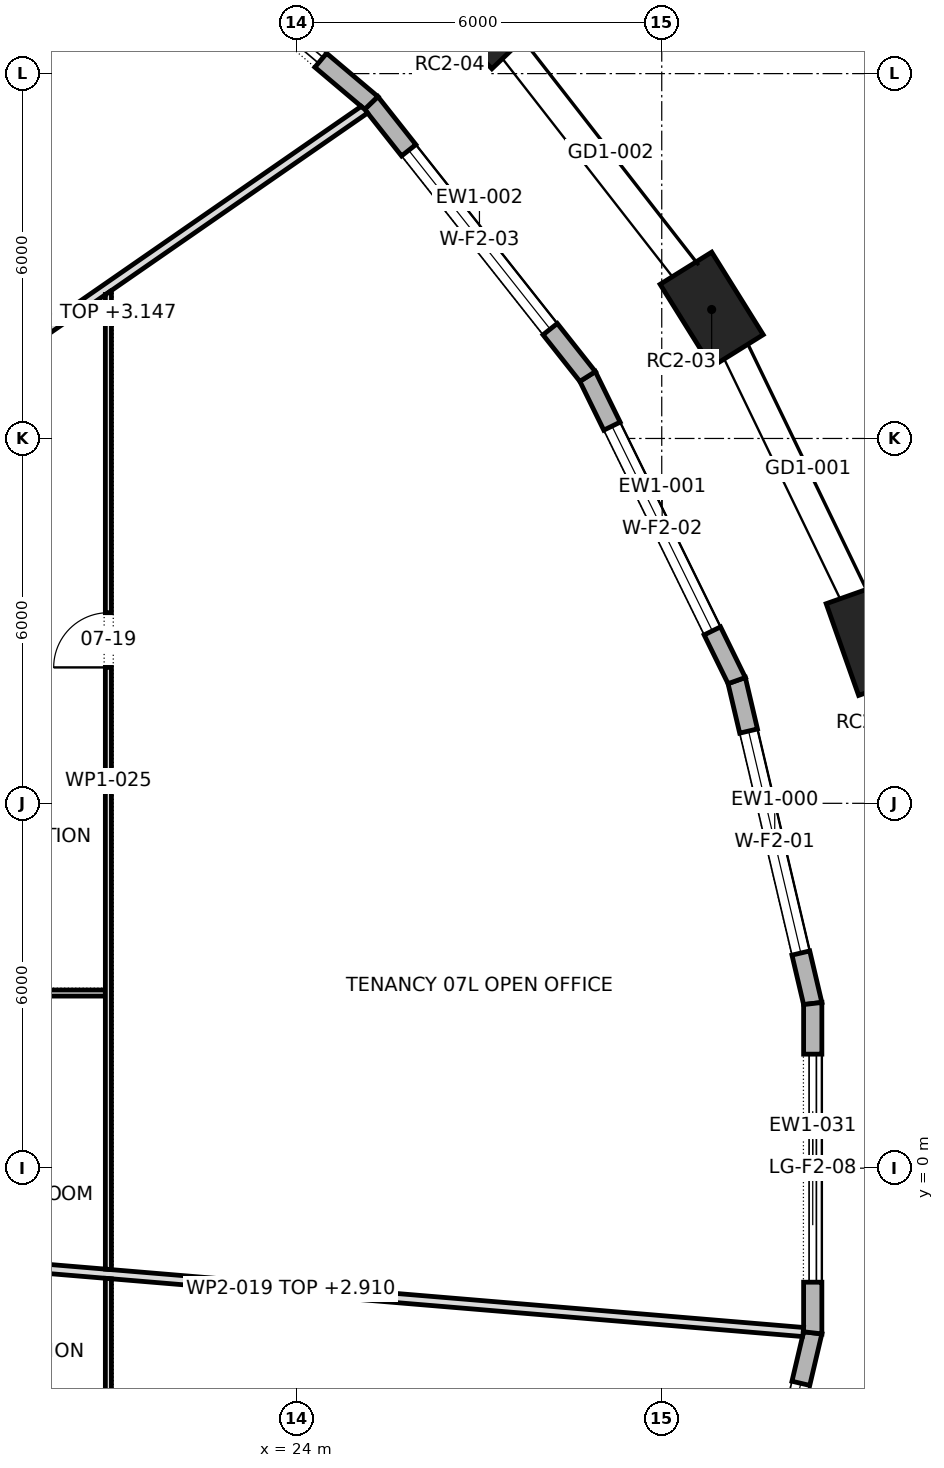
"""IFC4 building model, lengths in metres.
Left out: names, types, materials, properties, quantities, classifications, styles, units other than length and angle.
Written with IfcOpenShell. Run it as: python <this file> out.ifc"""

import sys

from ifc_helpers import new_model, si_unit, direction, frame, frame_2d, origin, origin_2d, place, context, subcontext, project, spatial, polyline, rectangle, outline, extrude, element, fill, save


model = new_model("IFC4")
c1 = context("Model", 3, precision=1e-05, world=origin(), true_north=direction((0.0, 1.0)))
c2 = subcontext(c1, "Body", "Model", "MODEL_VIEW")
j1 = project(units=[si_unit("LENGTHUNIT", "METRE"), si_unit("PLANEANGLEUNIT", "RADIAN")], contexts=[c1])
p1 = place(None, origin())
s1 = spatial("IfcSite", under=j1, at=p1, CompositionType="ELEMENT")
p2 = place(p1, origin())
s2 = spatial("IfcBuilding", under=s1, at=p2, CompositionType="ELEMENT")
p3 = place(p2, frame((0.0, 0.0, 112.9)))
s3 = spatial("IfcBuildingStorey", under=s2, at=p3, CompositionType="ELEMENT", Elevation=112.9)
for number, where, z_axis, x_axis in (
    (1, (33.443, 8.695, 0.0), (0.0, 0.0, 1.0), (-0.334, 0.943, 0.0)),
    (2, (30.821, 14.121, 0.0), (0.0, 0.0, 1.0), (-0.529, 0.849, 0.0)),
    (3, (27.015, 19.003, 0.0), (0.0, 0.0, 1.0), (-0.692, 0.722, 0.0)),
):
    element("IfcColumn", number, at=place(p3, frame(where, z_axis=z_axis, x_axis=x_axis)), inside=s3, PredefinedType="COLUMN", context=c2, shape_type="SweptSolid", body=[
        extrude(rectangle(XDim=1.6, YDim=1.0, at=origin_2d()), origin(), (0.0, 0.0, 1.0), 4.2),
    ])
p4 = place(p3, frame((32.483, 2.708, 0.0), z_axis=(0.0, 0.0, 1.0), x_axis=(-0.229193964616, 0.973380771632, 0.0)))
e4 = element("IfcWall", 4, at=p4, inside=s3, PredefinedType="STANDARD", context=c2, shape_type="SweptSolid", body=[
    extrude(outline(polyline([(-0.017, -0.15), (5.473, -0.15), (5.439, 0.15), (0.017, 0.15), (-0.017, -0.15)])), origin(), (0.0, 0.0, 1.0), 3.9),
])
p5 = place(p4, frame((0.853, 0.0, 0.6)))
e5 = element("IfcOpeningElement", 5, at=p5, cuts=e4, PredefinedType="OPENING", context=c2, shape_type="SweptSolid", body=[
    extrude(rectangle(XDim=3.75, YDim=2.85, at=frame_2d((1.875, 1.425))), frame((0.0, 0.162, 0.0), z_axis=(0.0, -1.0, 0.0), x_axis=(1.0, 0.0, 0.0)), (0.0, 0.0, 1.0), 0.324),
])
p6 = place(p3, frame((31.233, 8.019, 0.0), z_axis=(0.0, 0.0, 1.0), x_axis=(-0.440238988749, 0.897880633929, 0.0)))
e6 = element("IfcWall", 6, at=p6, inside=s3, PredefinedType="STANDARD", context=c2, shape_type="SweptSolid", body=[
    extrude(outline(polyline([(-0.017, -0.15), (5.586, -0.15), (5.553, 0.15), (0.017, 0.15), (-0.017, -0.15)])), origin(), (0.0, 0.0, 1.0), 3.9),
])
p7 = place(p6, frame((0.91, 0.0, 0.6)))
e7 = element("IfcOpeningElement", 7, at=p7, cuts=e6, PredefinedType="OPENING", context=c2, shape_type="SweptSolid", body=[
    extrude(rectangle(XDim=3.75, YDim=2.85, at=frame_2d((1.875, 1.425))), frame((0.0, 0.162, 0.0), z_axis=(0.0, -1.0, 0.0), x_axis=(1.0, 0.0, 0.0)), (0.0, 0.0, 1.0), 0.324),
])
p8 = place(p3, frame((28.781, 13.019, 0.0), z_axis=(0.0, 0.0, 1.0), x_axis=(-0.620329992039, 0.784340934146, 0.0)))
e8 = element("IfcWall", 8, at=p8, inside=s3, PredefinedType="STANDARD", context=c2, shape_type="SweptSolid", body=[
    extrude(outline(polyline([(-0.016, -0.15), (5.75, -0.15), (5.72, 0.15), (0.016, 0.15), (-0.016, -0.15)])), origin(), (0.0, 0.0, 1.0), 3.9),
])
p9 = place(p8, frame((0.993, 0.0, 0.6)))
e9 = element("IfcOpeningElement", 9, at=p9, cuts=e8, PredefinedType="OPENING", context=c2, shape_type="SweptSolid", body=[
    extrude(rectangle(XDim=3.75, YDim=2.85, at=frame_2d((1.875, 1.425))), frame((0.0, 0.162, 0.0), z_axis=(0.0, -1.0, 0.0), x_axis=(1.0, 0.0, 0.0)), (0.0, 0.0, 1.0), 0.324),
])
p10 = place(p3, frame((25.223, 17.518, 0.0), z_axis=(0.0, 0.0, 1.0), x_axis=(-0.763894031266, 0.645341699409, 0.0)))
e10 = element("IfcWall", 10, at=p10, inside=s3, PredefinedType="STANDARD", context=c2, shape_type="SweptSolid", body=[
    extrude(outline(polyline([(-0.015, -0.15), (5.939, -0.15), (5.911, 0.15), (0.015, 0.15), (-0.015, -0.15)])), origin(), (0.0, 0.0, 1.0), 3.9),
])
p11 = place(p10, frame((1.087, 0.0, 0.0)))
e11 = element("IfcOpeningElement", 11, at=p11, cuts=e10, PredefinedType="OPENING", context=c2, shape_type="SweptSolid", body=[
    extrude(rectangle(XDim=3.75, YDim=3.45, at=frame_2d((1.875, 1.725))), frame((0.0, 0.162, 0.0), z_axis=(0.0, -1.0, 0.0), x_axis=(1.0, 0.0, 0.0)), (0.0, 0.0, 1.0), 0.324),
])
p12 = place(p3, frame((31.233, -8.019, 0.0), z_axis=(0.0, 0.0, 1.0), x_axis=(0.229193964616, 0.973380771632, 0.0)))
e12 = element("IfcWall", 12, at=p12, inside=s3, PredefinedType="STANDARD", context=c2, shape_type="SweptSolid", body=[
    extrude(outline(polyline([(-0.017, -0.15), (5.473, -0.15), (5.439, 0.15), (0.017, 0.15), (-0.017, -0.15)])), origin(), (0.0, 0.0, 1.0), 3.9),
])
p13 = place(p12, frame((0.853, 0.0, 0.6)))
e13 = element("IfcOpeningElement", 13, at=p13, cuts=e12, PredefinedType="OPENING", context=c2, shape_type="SweptSolid", body=[
    extrude(rectangle(XDim=3.75, YDim=2.85, at=frame_2d((1.875, 1.425))), frame((0.0, 0.162, 0.0), z_axis=(0.0, -1.0, 0.0), x_axis=(1.0, 0.0, 0.0)), (0.0, 0.0, 1.0), 0.324),
])
p14 = place(p3, frame((32.483, -2.708, 0.0), z_axis=(0.0, 0.0, 1.0), x_axis=(0.0, 1.0, 0.0)))
e14 = element("IfcWall", 14, at=p14, inside=s3, PredefinedType="STANDARD", context=c2, shape_type="SweptSolid", body=[
    extrude(outline(polyline([(-0.017, -0.15), (5.433, -0.15), (5.398, 0.15), (0.017, 0.15), (-0.017, -0.15)])), origin(), (0.0, 0.0, 1.0), 3.9),
])
p15 = place(p14, frame((0.833, 0.0, 0.0)))
e15 = element("IfcOpeningElement", 15, at=p15, cuts=e14, PredefinedType="OPENING", context=c2, shape_type="SweptSolid", body=[
    extrude(rectangle(XDim=3.75, YDim=3.45, at=frame_2d((1.875, 1.725))), frame((0.0, 0.162, 0.0), z_axis=(0.0, -1.0, 0.0), x_axis=(1.0, 0.0, 0.0)), (0.0, 0.0, 1.0), 0.324),
])
p16 = place(p3, frame((15.454, -1.284, 0.0), z_axis=(0.0, 0.0, 1.0), x_axis=(0.996525641357, -0.083286530234, 0.0)))
e16 = element("IfcWall", 16, at=p16, inside=s3, PredefinedType="PARTITIONING", context=c2, shape_type="SweptSolid", body=[
    extrude(outline(polyline([(0.028, -0.075), (1.905, -0.075), (3.783, -0.075), (5.66, -0.075), (7.538, -0.075), (9.416, -0.075), (11.293, -0.075), (13.171, -0.075), (15.048, -0.075), (16.926, -0.075), (16.931, -0.038), (16.931, 0.075), (15.05, 0.075), (13.169, 0.075), (11.288, 0.075), (9.406, 0.075), (7.525, 0.075), (5.644, 0.075), (3.762, 0.075), (1.881, 0.075), (0.0, 0.075), (0.0, 0.074), (0.006, 0.005), (0.021, 0.006), (0.028, -0.075)])), origin(), (0.0, 0.0, 1.0), 2.91),
])
p17 = place(p3, frame((15.46, 2.88, 0.0), z_axis=(0.0, 0.0, 1.0), x_axis=(1.0, 0.0, 0.0)))
e17 = element("IfcWall", 17, at=p17, inside=s3, PredefinedType="PARTITIONING", context=c2, shape_type="SweptSolid", body=[
    extrude(outline(polyline([(0.0, -0.05), (1.797, -0.05), (3.593, -0.05), (5.39, -0.05), (5.39, 0.05), (3.598, 0.05), (1.806, 0.05), (0.015, 0.05), (0.015, 0.0), (0.0, 0.0), (0.0, -0.05)])), origin(), (0.0, 0.0, 1.0), 3.9),
])
p18 = place(p3, frame((15.433, 10.702, 0.0), z_axis=(0.0, 0.0, 1.0), x_axis=(0.82202509952, 0.569451258458, 0.0)))
e18 = element("IfcWall", 18, at=p18, inside=s3, PredefinedType="PARTITIONING", context=c2, shape_type="SweptSolid", body=[
    extrude(outline(polyline([(0.0, -0.075), (1.635, -0.075), (3.269, -0.075), (4.904, -0.075), (6.538, -0.075), (6.54, -0.072), (6.544, -0.075), (8.291, -0.075), (10.038, -0.075), (11.785, -0.075), (11.785, -0.071), (11.78, 0.003), (11.761, 0.075), (9.818, 0.075), (7.875, 0.075), (5.932, 0.075), (3.989, 0.075), (2.046, 0.075), (0.104, 0.075), (0.0, -0.074), (0.0, -0.075)])), origin(), (0.0, 0.0, 1.0), 3.147),
])
p19 = place(p3, frame((20.9, -1.811, 0.0), z_axis=(0.0, 0.0, 1.0), x_axis=(0.0, -1.0, 0.0)))
e19 = element("IfcWall", 19, at=p19, inside=s3, PredefinedType="PARTITIONING", context=c2, shape_type="SweptSolid", body=[
    extrude(outline(polyline([(0.0, -0.05), (1.879, -0.05), (3.759, -0.05), (5.638, -0.05), (7.518, -0.05), (7.562, 0.049), (7.562, 0.05), (5.674, 0.05), (3.785, 0.05), (1.897, 0.05), (0.008, 0.05), (0.0, -0.047), (0.0, -0.05)])), origin(), (0.0, 0.0, 1.0), 3.9),
])
p20 = place(p19, frame((3.324, 0.0, 0.0)))
e20 = element("IfcOpeningElement", 20, at=p20, cuts=e19, PredefinedType="OPENING", context=c2, shape_type="SweptSolid", body=[
    extrude(rectangle(XDim=0.9, YDim=2.1, at=frame_2d((0.45, 1.05))), frame((0.0, 0.062, 0.0), z_axis=(0.0, -1.0, 0.0), x_axis=(1.0, 0.0, 0.0)), (0.0, 0.0, 1.0), 0.124),
])
p21 = place(p3, frame((20.9, -1.668, 0.0), z_axis=(0.0, 0.0, 1.0), x_axis=(0.0, 1.0, 0.0)))
e21 = element("IfcWall", 21, at=p21, inside=s3, PredefinedType="PARTITIONING", context=c2, shape_type="SweptSolid", body=[
    extrude(outline(polyline([(16.102, -0.05), (16.102, -0.05), (16.032, 0.05), (14.127, 0.05), (12.221, 0.05), (10.315, 0.05), (8.41, 0.05), (6.504, 0.05), (4.598, 0.05), (4.598, 0.05), (4.499, 0.05), (4.499, 0.05), (3.002, 0.05), (1.505, 0.05), (0.008, 0.05), (0.0, -0.049), (0.0, -0.05), (1.789, -0.05), (3.578, -0.05), (5.367, -0.05), (7.156, -0.05), (8.945, -0.05), (10.734, -0.05), (12.523, -0.05), (14.312, -0.05), (16.102, -0.05)])), origin(), (0.0, 0.0, 1.0), 3.9),
])
p22 = place(p21, frame((9.904, 0.0, 0.0)))
e22 = element("IfcOpeningElement", 22, at=p22, cuts=e21, PredefinedType="OPENING", context=c2, shape_type="SweptSolid", body=[
    extrude(rectangle(XDim=0.9, YDim=2.1, at=frame_2d((0.45, 1.05))), frame((0.0, 0.062, 0.0), z_axis=(0.0, -1.0, 0.0), x_axis=(1.0, 0.0, 0.0)), (0.0, 0.0, 1.0), 0.124),
])
p23 = place(p5, origin())
e23 = element("IfcWindow", 23, at=p23, inside=s3, PartitioningType="TRIPLE_PANEL_VERTICAL", PredefinedType="WINDOW", context=c2, shape_type="SweptSolid", body=[
    extrude(rectangle(XDim=3.75, YDim=2.85, at=frame_2d((1.875, 1.425))), frame((0.0, 0.03, 0.0), z_axis=(0.0, -1.0, 0.0), x_axis=(1.0, 0.0, 0.0)), (0.0, 0.0, 1.0), 0.06),
])
fill(e5, e23)
p24 = place(p7, origin())
e24 = element("IfcWindow", 24, at=p24, inside=s3, PartitioningType="TRIPLE_PANEL_VERTICAL", PredefinedType="WINDOW", context=c2, shape_type="SweptSolid", body=[
    extrude(rectangle(XDim=3.75, YDim=2.85, at=frame_2d((1.875, 1.425))), frame((0.0, 0.03, 0.0), z_axis=(0.0, -1.0, 0.0), x_axis=(1.0, 0.0, 0.0)), (0.0, 0.0, 1.0), 0.06),
])
fill(e7, e24)
p25 = place(p9, origin())
e25 = element("IfcWindow", 25, at=p25, inside=s3, PartitioningType="TRIPLE_PANEL_VERTICAL", PredefinedType="WINDOW", context=c2, shape_type="SweptSolid", body=[
    extrude(rectangle(XDim=3.75, YDim=2.85, at=frame_2d((1.875, 1.425))), frame((0.0, 0.03, 0.0), z_axis=(0.0, -1.0, 0.0), x_axis=(1.0, 0.0, 0.0)), (0.0, 0.0, 1.0), 0.06),
])
fill(e9, e25)
p26 = place(p11, origin())
e26 = element("IfcDoor", 26, at=p26, inside=s3, OperationType="DOUBLE_DOOR_SLIDING", PredefinedType="DOOR", context=c2, shape_type="SweptSolid", body=[
    extrude(rectangle(XDim=3.75, YDim=3.45, at=frame_2d((1.875, 1.725))), frame((0.0, 0.025, 0.0), z_axis=(0.0, -1.0, 0.0), x_axis=(1.0, 0.0, 0.0)), (0.0, 0.0, 1.0), 0.05),
])
fill(e11, e26)
p27 = place(p13, origin())
e27 = element("IfcWindow", 27, at=p27, inside=s3, PartitioningType="TRIPLE_PANEL_VERTICAL", PredefinedType="WINDOW", context=c2, shape_type="SweptSolid", body=[
    extrude(rectangle(XDim=3.75, YDim=2.85, at=frame_2d((1.875, 1.425))), frame((0.0, 0.03, 0.0), z_axis=(0.0, -1.0, 0.0), x_axis=(1.0, 0.0, 0.0)), (0.0, 0.0, 1.0), 0.06),
])
fill(e13, e27)
p28 = place(p15, origin())
e28 = element("IfcDoor", 28, at=p28, inside=s3, OperationType="DOUBLE_DOOR_SLIDING", PredefinedType="DOOR", context=c2, shape_type="SweptSolid", body=[
    extrude(rectangle(XDim=3.75, YDim=3.45, at=frame_2d((1.875, 1.725))), frame((0.0, 0.025, 0.0), z_axis=(0.0, -1.0, 0.0), x_axis=(1.0, 0.0, 0.0)), (0.0, 0.0, 1.0), 0.05),
])
fill(e15, e28)
p29 = place(p22, origin())
e29 = element("IfcDoor", 29, at=p29, inside=s3, OperationType="SINGLE_SWING_RIGHT", PredefinedType="DOOR", context=c2, shape_type="SweptSolid", body=[
    extrude(rectangle(XDim=0.9, YDim=2.1, at=frame_2d((0.45, 1.05))), frame((0.0, 0.025, 0.0), z_axis=(0.0, -1.0, 0.0), x_axis=(1.0, 0.0, 0.0)), (0.0, 0.0, 1.0), 0.05),
])
fill(e22, e29)
save(model, sys.argv[1])
